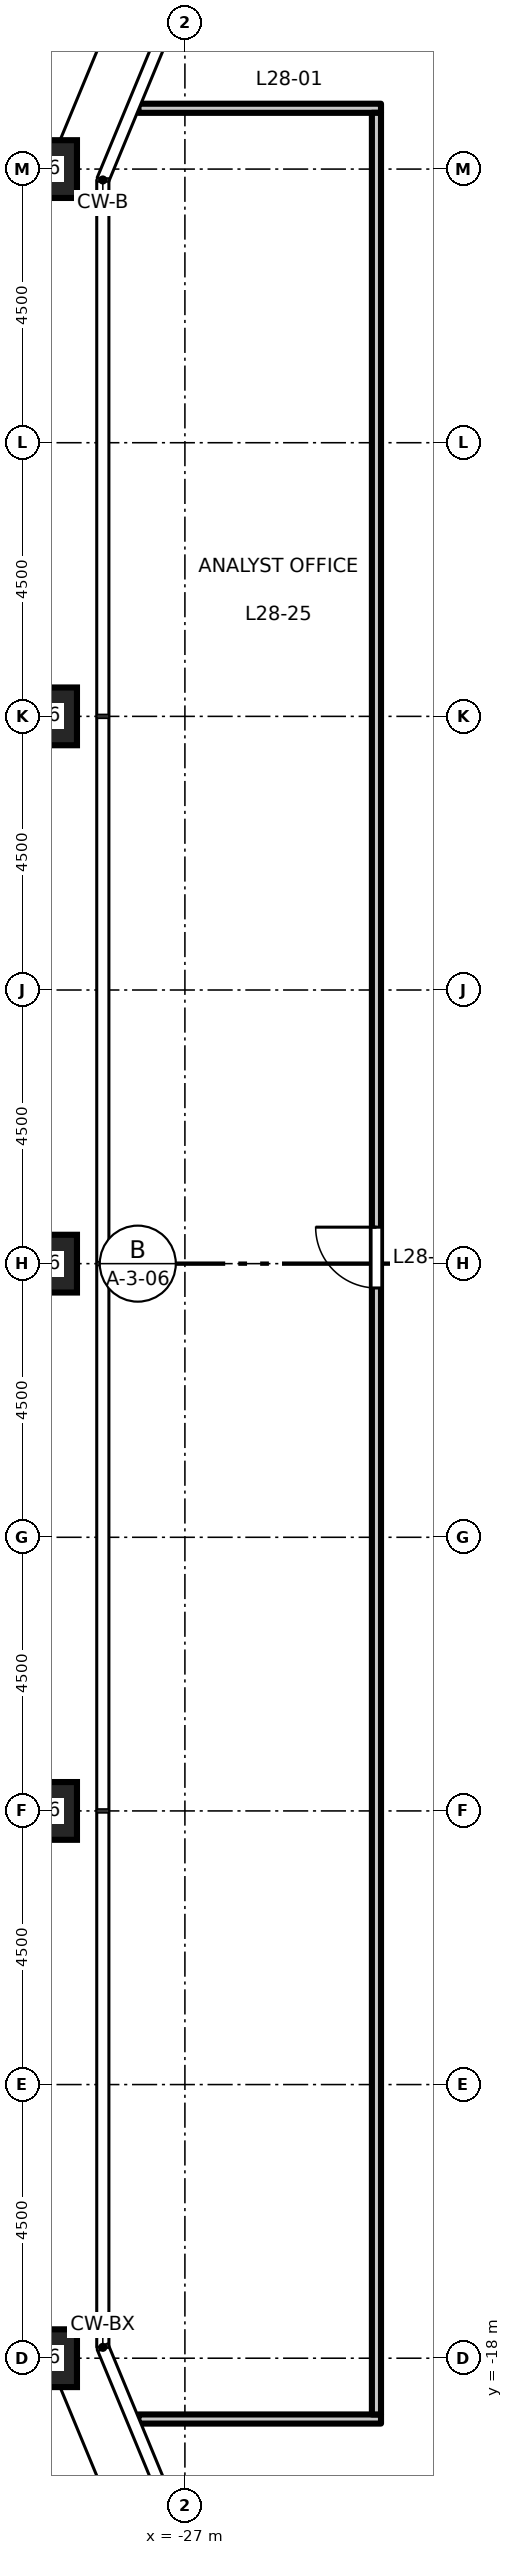
"""IFC4 building model, lengths in metres.
Left out: names, types, materials, properties, quantities, classifications, styles, units other than length and angle.
Written with IfcOpenShell. Run it as: python <this file> out.ifc"""

import sys

from ifc_helpers import new_model, si_unit, direction, frame, frame_2d, origin, origin_2d, place, context, subcontext, project, spatial, rectangle, hollow_rectangle, extrude, element, fill, save


model = new_model("IFC4")
c1 = context("Model", 3, precision=1e-05, world=origin(), true_north=direction((0.0, 1.0)))
c2 = subcontext(c1, "Body", "Model", "MODEL_VIEW")
j1 = project(units=[si_unit("LENGTHUNIT", "METRE"), si_unit("PLANEANGLEUNIT", "RADIAN")], contexts=[c1])
p1 = place(None, origin())
s1 = spatial("IfcSite", under=j1, at=p1, CompositionType="ELEMENT")
p2 = place(p1, origin())
s2 = spatial("IfcBuilding", under=s1, at=p2, CompositionType="ELEMENT")
p3 = place(p2, frame((0.0, 0.0, 131.7)))
s3 = spatial("IfcBuildingStorey", under=s2, at=p3, CompositionType="ELEMENT", Elevation=131.7)
for number, where, z_axis, x_axis in (
    (1, (-29.25, 18.0, 0.0), (0.0, 0.0, 1.0), (1.0, 0.0, 0.0)),
    (2, (-29.25, 9.0, 0.0), (0.0, 0.0, 1.0), (1.0, 0.0, 0.0)),
    (3, (-29.25, 0.0, 0.0), (0.0, 0.0, 1.0), (1.0, 0.0, 0.0)),
    (4, (-29.25, -9.0, 0.0), (0.0, 0.0, 1.0), (1.0, 0.0, 0.0)),
    (5, (-29.25, -18.0, 0.0), (0.0, 0.0, 1.0), (1.0, 0.0, 0.0)),
):
    element("IfcColumn", number, at=place(p3, frame(where, z_axis=z_axis, x_axis=x_axis)), inside=s3, PredefinedType="COLUMN", context=c2, shape_type="SweptSolid", body=[
        extrude(hollow_rectangle(XDim=0.95, YDim=0.95, WallThickness=0.055, at=origin_2d()), origin(), (0.0, 0.0, 1.0), 4.5),
    ])
for number, where, z_axis, x_axis in (
    (6, (-27.764, -19.0, 0.0), (0.0, 0.0, 1.0), (1.0, 0.0, 0.0)),
    (7, (-27.764, 19.0, 0.0), (0.0, 0.0, 1.0), (1.0, 0.0, 0.0)),
):
    element("IfcWall", number, at=place(p3, frame(where, z_axis=z_axis, x_axis=x_axis)), inside=s3, PredefinedType="PARTITIONING", context=c2, shape_type="SweptSolid", body=[
        extrude(rectangle(XDim=3.989, YDim=0.15, at=frame_2d((1.995, 0.0))), origin(), (0.0, 0.0, 1.0), 4.35),
    ])
p4 = place(p3, frame((-23.85, -18.925, 0.0), z_axis=(0.0, 0.0, 1.0), x_axis=(0.0, 1.0, 0.0)))
e8 = element("IfcWall", 8, at=p4, inside=s3, PredefinedType="PARTITIONING", context=c2, shape_type="SweptSolid", body=[
    extrude(rectangle(XDim=37.85, YDim=0.15, at=frame_2d((18.925, 0.0))), origin(), (0.0, 0.0, 1.0), 4.35),
])
p5 = place(p4, frame((18.525, 0.0, 0.0)))
e9 = element("IfcOpeningElement", 9, at=p5, cuts=e8, PredefinedType="OPENING", context=c2, shape_type="SweptSolid", body=[
    extrude(rectangle(XDim=1.0, YDim=2.1, at=frame_2d((0.5, 1.05))), frame((0.0, 0.085, 0.0), z_axis=(0.0, -1.0, 0.0), x_axis=(1.0, 0.0, 0.0)), (0.0, 0.0, 1.0), 0.17),
])
p6 = place(p5, origin())
e10 = element("IfcDoor", 10, at=p6, inside=s3, OperationType="SINGLE_SWING_RIGHT", PredefinedType="DOOR", context=c2, shape_type="SweptSolid", body=[
    extrude(rectangle(XDim=1.0, YDim=2.1, at=frame_2d((0.5, 1.05))), frame((0.0, 0.025, 0.0), z_axis=(0.0, -1.0, 0.0), x_axis=(1.0, 0.0, 0.0)), (0.0, 0.0, 1.0), 0.05),
])
fill(e9, e10)
save(model, sys.argv[1])
